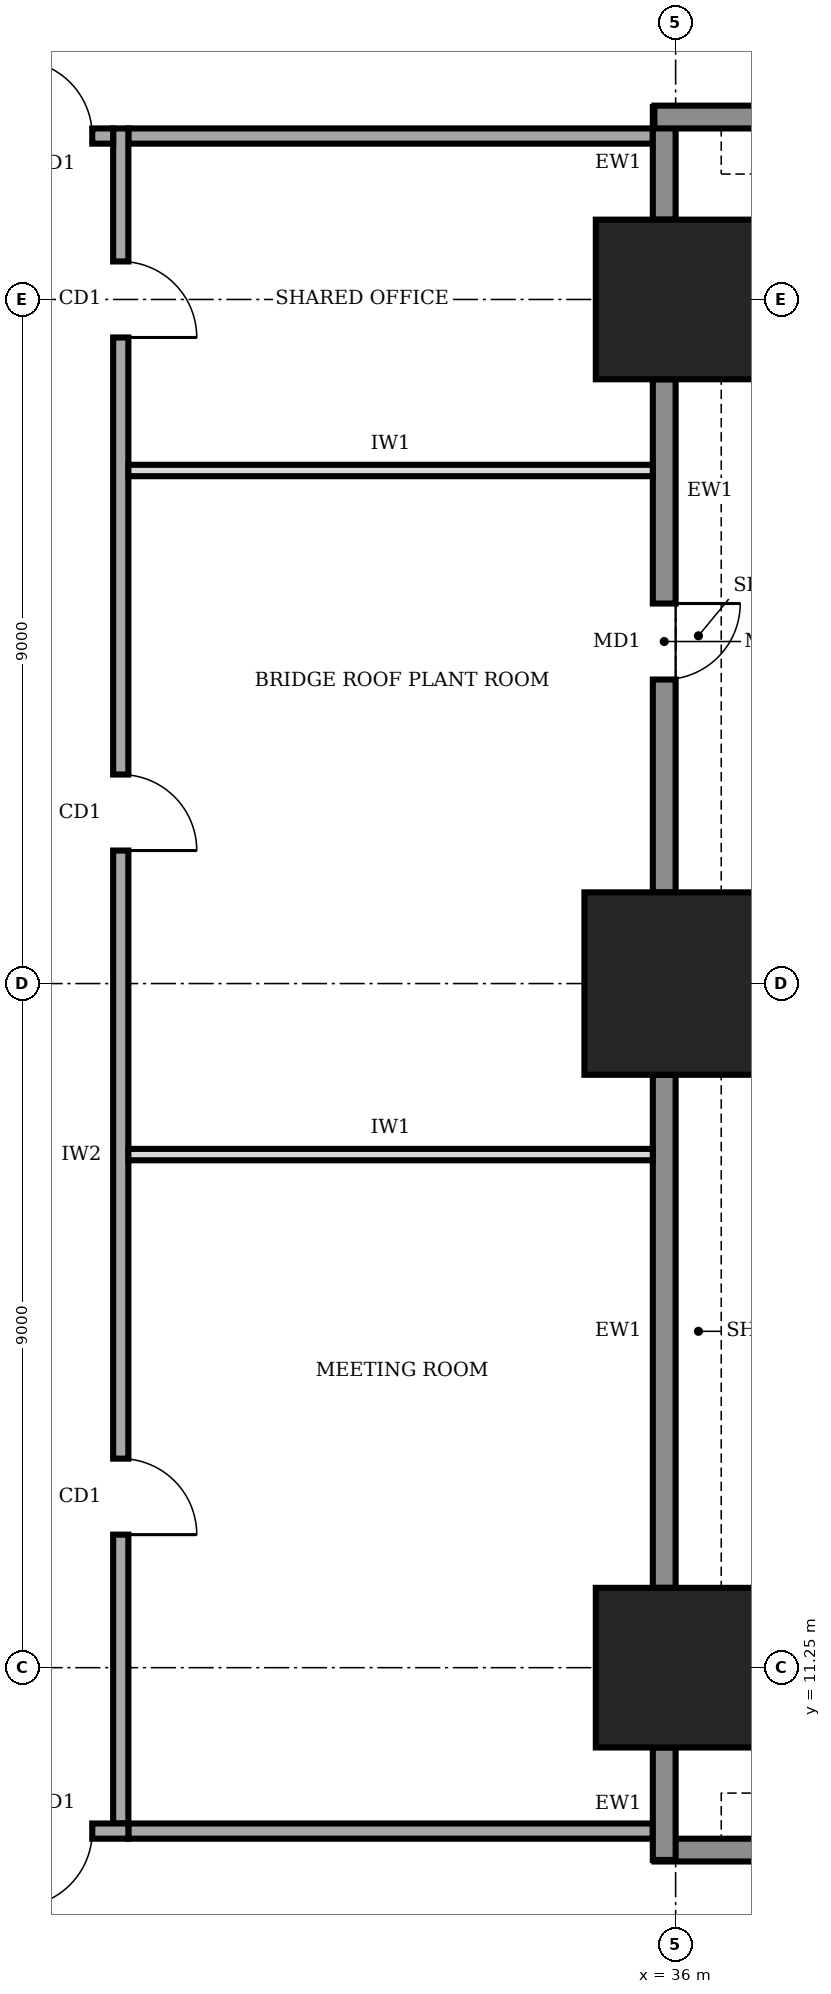
"""IFC4 building model, lengths in metres.
Left out: names, types, materials, properties, quantities, classifications, styles, units other than length and angle.
Written with IfcOpenShell. Run it as: python <this file> out.ifc"""

import sys

from ifc_helpers import new_model, si_unit, direction, frame, frame_2d, origin, origin_2d, place, context, subcontext, project, spatial, rectangle, extrude, element, fill, save


model = new_model("IFC4")
c1 = context("Model", 3, precision=1e-05, world=origin(), true_north=direction((0.0, 1.0)))
c2 = subcontext(c1, "Body", "Model", "MODEL_VIEW")
j1 = project(units=[si_unit("LENGTHUNIT", "METRE"), si_unit("PLANEANGLEUNIT", "RADIAN")], contexts=[c1])
p1 = place(None, origin())
s1 = spatial("IfcSite", under=j1, at=p1, CompositionType="ELEMENT")
p2 = place(p1, origin())
s2 = spatial("IfcBuilding", under=s1, at=p2, CompositionType="ELEMENT")
p3 = place(p2, frame((0.0, 0.0, 137.0)))
s3 = spatial("IfcBuildingStorey", under=s2, at=p3, CompositionType="ELEMENT", Elevation=137.0)
p4 = place(p3, frame((36.0, 11.25, 0.0), z_axis=(0.0, 0.0, 1.0), x_axis=(1.0, 0.0, 0.0)))
e1 = element("IfcColumn", 1, at=p4, inside=s3, PredefinedType="COLUMN", context=c2, shape_type="SweptSolid", body=[
    extrude(rectangle(XDim=2.1, YDim=2.1, at=origin_2d()), origin(), (0.0, 0.0, 1.0), 4.0),
])
p5 = place(p3, frame((36.0, 20.25, 0.0), z_axis=(0.0, 0.0, 1.0), x_axis=(1.0, 0.0, 0.0)))
e2 = element("IfcColumn", 2, at=p5, inside=s3, PredefinedType="COLUMN", context=c2, shape_type="SweptSolid", body=[
    extrude(rectangle(XDim=2.4, YDim=2.4, at=origin_2d()), origin(), (0.0, 0.0, 1.0), 4.0),
])
p6 = place(p3, frame((36.0, 29.25, 0.0), z_axis=(0.0, 0.0, 1.0), x_axis=(1.0, 0.0, 0.0)))
e3 = element("IfcColumn", 3, at=p6, inside=s3, PredefinedType="COLUMN", context=c2, shape_type="SweptSolid", body=[
    extrude(rectangle(XDim=2.1, YDim=2.1, at=origin_2d()), origin(), (0.0, 0.0, 1.0), 4.0),
])
p7 = place(p3, frame((40.48, 8.85, 0.0), z_axis=(0.0, 0.0, 1.0), x_axis=(-1.0, 0.0, 0.0)))
e4 = element("IfcWall", 4, at=p7, inside=s3, PredefinedType="STANDARD", context=c2, shape_type="SweptSolid", body=[
    extrude(rectangle(XDim=4.76, YDim=0.3, at=frame_2d((2.38, 0.0))), origin(), (0.0, 0.0, 1.0), 3.75),
])
p8 = place(p3, frame((35.85, 8.72, 0.0), z_axis=(0.0, 0.0, 1.0), x_axis=(0.0, 1.0, 0.0)))
e5 = element("IfcWall", 5, at=p8, inside=s3, PredefinedType="STANDARD", context=c2, shape_type="SweptSolid", body=[
    extrude(rectangle(XDim=1.48, YDim=0.3, at=frame_2d((0.74, 0.0))), origin(), (0.0, 0.0, 1.0), 2.65),
])
p9 = place(p3, frame((35.85, 12.3, 0.0), z_axis=(0.0, 0.0, 1.0), x_axis=(0.0, 1.0, 0.0)))
e6 = element("IfcWall", 6, at=p9, inside=s3, PredefinedType="STANDARD", context=c2, shape_type="SweptSolid", body=[
    extrude(rectangle(XDim=6.75, YDim=0.3, at=frame_2d((3.375, 0.0))), origin(), (0.0, 0.0, 1.0), 2.65),
])
p10 = place(p3, frame((35.85, 21.45, 0.0), z_axis=(0.0, 0.0, 1.0), x_axis=(0.0, 1.0, 0.0)))
e7 = element("IfcWall", 7, at=p10, inside=s3, PredefinedType="STANDARD", context=c2, shape_type="SweptSolid", body=[
    extrude(rectangle(XDim=6.75, YDim=0.3, at=frame_2d((3.375, 0.0))), origin(), (0.0, 0.0, 1.0), 2.65),
])
p11 = place(p10, frame((2.8, 0.0, 0.0)))
e8 = element("IfcOpeningElement", 8, at=p11, cuts=e7, PredefinedType="OPENING", context=c2, shape_type="SweptSolid", body=[
    extrude(rectangle(XDim=1.0, YDim=2.1, at=frame_2d((0.5, 1.05))), frame((0.0, 0.16, 0.0), z_axis=(0.0, -1.0, 0.0), x_axis=(1.0, 0.0, 0.0)), (0.0, 0.0, 1.0), 0.32),
])
p12 = place(p3, frame((35.85, 30.3, 0.0), z_axis=(0.0, 0.0, 1.0), x_axis=(0.0, 1.0, 0.0)))
e9 = element("IfcWall", 9, at=p12, inside=s3, PredefinedType="STANDARD", context=c2, shape_type="SweptSolid", body=[
    extrude(rectangle(XDim=1.48, YDim=0.3, at=frame_2d((0.74, 0.0))), origin(), (0.0, 0.0, 1.0), 2.65),
])
p13 = place(p3, frame((35.72, 31.65, 0.0), z_axis=(0.0, 0.0, 1.0), x_axis=(1.0, 0.0, 0.0)))
e10 = element("IfcWall", 10, at=p13, inside=s3, PredefinedType="STANDARD", context=c2, shape_type="SweptSolid", body=[
    extrude(rectangle(XDim=4.76, YDim=0.3, at=frame_2d((2.38, 0.0))), origin(), (0.0, 0.0, 1.0), 3.75),
])
p14 = place(p3, frame((11.9, 9.1, 0.0), z_axis=(0.0, 0.0, 1.0), x_axis=(1.0, 0.0, 0.0)))
e11 = element("IfcWall", 11, at=p14, inside=s3, PredefinedType="SOLIDWALL", context=c2, shape_type="SweptSolid", body=[
    extrude(rectangle(XDim=16.9, YDim=0.2, at=frame_2d((8.45, 0.0))), origin(), (0.0, 0.0, 1.0), 3.75),
])
p15 = place(p14, frame((0.275, 0.0, 0.0)))
e12 = element("IfcOpeningElement", 12, at=p15, cuts=e11, PredefinedType="OPENING", context=c2, shape_type="SweptSolid", body=[
    extrude(rectangle(XDim=1.0, YDim=2.1, at=frame_2d((0.5, 1.05))), frame((0.0, 0.11, 0.0), z_axis=(0.0, -1.0, 0.0), x_axis=(1.0, 0.0, 0.0)), (0.0, 0.0, 1.0), 0.22),
])
p16 = place(p14, frame((5.6, 0.0, 0.0)))
e13 = element("IfcOpeningElement", 13, at=p16, cuts=e11, PredefinedType="OPENING", context=c2, shape_type="SweptSolid", body=[
    extrude(rectangle(XDim=1.0, YDim=2.1, at=frame_2d((0.5, 1.05))), frame((0.0, 0.11, 0.0), z_axis=(0.0, -1.0, 0.0), x_axis=(1.0, 0.0, 0.0)), (0.0, 0.0, 1.0), 0.22),
])
p17 = place(p14, frame((12.35, 0.0, 0.0)))
e14 = element("IfcOpeningElement", 14, at=p17, cuts=e11, PredefinedType="OPENING", context=c2, shape_type="SweptSolid", body=[
    extrude(rectangle(XDim=1.0, YDim=2.1, at=frame_2d((0.5, 1.05))), frame((0.0, 0.11, 0.0), z_axis=(0.0, -1.0, 0.0), x_axis=(1.0, 0.0, 0.0)), (0.0, 0.0, 1.0), 0.22),
])
p18 = place(p14, frame((15.425, 0.0, 0.0)))
e15 = element("IfcOpeningElement", 15, at=p18, cuts=e11, PredefinedType="OPENING", context=c2, shape_type="SweptSolid", body=[
    extrude(rectangle(XDim=1.0, YDim=2.1, at=frame_2d((0.5, 1.05))), frame((0.0, 0.11, 0.0), z_axis=(0.0, -1.0, 0.0), x_axis=(1.0, 0.0, 0.0)), (0.0, 0.0, 1.0), 0.22),
])
p19 = place(p3, frame((28.7, 9.2, 0.0), z_axis=(0.0, 0.0, 1.0), x_axis=(0.0, 1.0, 0.0)))
e16 = element("IfcWall", 16, at=p19, inside=s3, PredefinedType="SOLIDWALL", context=c2, shape_type="SweptSolid", body=[
    extrude(rectangle(XDim=22.3, YDim=0.2, at=frame_2d((11.15, 0.0))), origin(), (0.0, 0.0, 1.0), 3.75),
])
p20 = place(p19, frame((3.8, 0.0, 0.0)))
e17 = element("IfcOpeningElement", 17, at=p20, cuts=e16, PredefinedType="OPENING", context=c2, shape_type="SweptSolid", body=[
    extrude(rectangle(XDim=1.0, YDim=2.1, at=frame_2d((0.5, 1.05))), frame((0.0, 0.11, 0.0), z_axis=(0.0, -1.0, 0.0), x_axis=(1.0, 0.0, 0.0)), (0.0, 0.0, 1.0), 0.22),
])
p21 = place(p19, frame((12.8, 0.0, 0.0)))
e18 = element("IfcOpeningElement", 18, at=p21, cuts=e16, PredefinedType="OPENING", context=c2, shape_type="SweptSolid", body=[
    extrude(rectangle(XDim=1.0, YDim=2.1, at=frame_2d((0.5, 1.05))), frame((0.0, 0.11, 0.0), z_axis=(0.0, -1.0, 0.0), x_axis=(1.0, 0.0, 0.0)), (0.0, 0.0, 1.0), 0.22),
])
p22 = place(p19, frame((19.55, 0.0, 0.0)))
e19 = element("IfcOpeningElement", 19, at=p22, cuts=e16, PredefinedType="OPENING", context=c2, shape_type="SweptSolid", body=[
    extrude(rectangle(XDim=1.0, YDim=2.1, at=frame_2d((0.5, 1.05))), frame((0.0, 0.11, 0.0), z_axis=(0.0, -1.0, 0.0), x_axis=(1.0, 0.0, 0.0)), (0.0, 0.0, 1.0), 0.22),
])
p23 = place(p3, frame((28.6, 31.4, 0.0), z_axis=(0.0, 0.0, 1.0), x_axis=(-1.0, 0.0, 0.0)))
e20 = element("IfcWall", 20, at=p23, inside=s3, PredefinedType="SOLIDWALL", context=c2, shape_type="SweptSolid", body=[
    extrude(rectangle(XDim=16.9, YDim=0.2, at=frame_2d((8.45, 0.0))), origin(), (0.0, 0.0, 1.0), 3.75),
])
p24 = place(p23, frame((15.425, 0.0, 0.0)))
e21 = element("IfcOpeningElement", 21, at=p24, cuts=e20, PredefinedType="OPENING", context=c2, shape_type="SweptSolid", body=[
    extrude(rectangle(XDim=1.0, YDim=2.1, at=frame_2d((0.5, 1.05))), frame((0.0, 0.11, 0.0), z_axis=(0.0, -1.0, 0.0), x_axis=(1.0, 0.0, 0.0)), (0.0, 0.0, 1.0), 0.22),
])
p25 = place(p23, frame((12.35, 0.0, 0.0)))
e22 = element("IfcOpeningElement", 22, at=p25, cuts=e20, PredefinedType="OPENING", context=c2, shape_type="SweptSolid", body=[
    extrude(rectangle(XDim=1.0, YDim=2.1, at=frame_2d((0.5, 1.05))), frame((0.0, 0.11, 0.0), z_axis=(0.0, -1.0, 0.0), x_axis=(1.0, 0.0, 0.0)), (0.0, 0.0, 1.0), 0.22),
])
p26 = place(p23, frame((5.6, 0.0, 0.0)))
e23 = element("IfcOpeningElement", 23, at=p26, cuts=e20, PredefinedType="OPENING", context=c2, shape_type="SweptSolid", body=[
    extrude(rectangle(XDim=1.0, YDim=2.1, at=frame_2d((0.5, 1.05))), frame((0.0, 0.11, 0.0), z_axis=(0.0, -1.0, 0.0), x_axis=(1.0, 0.0, 0.0)), (0.0, 0.0, 1.0), 0.22),
])
p27 = place(p23, frame((0.275, 0.0, 0.0)))
e24 = element("IfcOpeningElement", 24, at=p27, cuts=e20, PredefinedType="OPENING", context=c2, shape_type="SweptSolid", body=[
    extrude(rectangle(XDim=1.0, YDim=2.1, at=frame_2d((0.5, 1.05))), frame((0.0, 0.11, 0.0), z_axis=(0.0, -1.0, 0.0), x_axis=(1.0, 0.0, 0.0)), (0.0, 0.0, 1.0), 0.22),
])
for number, where, z_axis, x_axis in (
    (25, (28.8, 9.1, 0.0), (0.0, 0.0, 1.0), (1.0, 0.0, 0.0)),
    (26, (28.8, 31.4, 0.0), (0.0, 0.0, 1.0), (1.0, 0.0, 0.0)),
):
    element("IfcWall", number, at=place(p3, frame(where, z_axis=z_axis, x_axis=x_axis)), inside=s3, PredefinedType="SOLIDWALL", context=c2, shape_type="SweptSolid", body=[
        extrude(rectangle(XDim=6.9, YDim=0.2, at=frame_2d((3.45, 0.0))), origin(), (0.0, 0.0, 1.0), 3.75),
    ])
for number, where, z_axis, x_axis in (
    (27, (28.8, 18.0, 0.0), (0.0, 0.0, 1.0), (1.0, 0.0, 0.0)),
    (28, (28.8, 27.0, 0.0), (0.0, 0.0, 1.0), (1.0, 0.0, 0.0)),
):
    element("IfcWall", number, at=place(p3, frame(where, z_axis=z_axis, x_axis=x_axis)), inside=s3, PredefinedType="PARTITIONING", context=c2, shape_type="SweptSolid", body=[
        extrude(rectangle(XDim=6.9, YDim=0.15, at=frame_2d((3.45, 0.0))), origin(), (0.0, 0.0, 1.0), 3.75),
    ])
p28 = place(p11, frame((1.0, 0.0, 0.0), z_axis=(0.0, 0.0, 1.0), x_axis=(-1.0, 0.0, 0.0)))
e29 = element("IfcDoor", 29, at=p28, inside=s3, OperationType="SINGLE_SWING_LEFT", PredefinedType="DOOR", context=c2, shape_type="SweptSolid", body=[
    extrude(rectangle(XDim=1.0, YDim=2.1, at=frame_2d((0.5, 1.05))), frame((0.0, 0.025, 0.0), z_axis=(0.0, -1.0, 0.0), x_axis=(1.0, 0.0, 0.0)), (0.0, 0.0, 1.0), 0.05),
])
fill(e8, e29)
p29 = place(p18, frame((1.0, 0.0, 0.0), z_axis=(0.0, 0.0, 1.0), x_axis=(-1.0, 0.0, 0.0)))
e30 = element("IfcDoor", 30, at=p29, inside=s3, OperationType="SINGLE_SWING_RIGHT", PredefinedType="DOOR", context=c2, shape_type="SweptSolid", body=[
    extrude(rectangle(XDim=1.0, YDim=2.1, at=frame_2d((0.5, 1.05))), frame((0.0, 0.025, 0.0), z_axis=(0.0, -1.0, 0.0), x_axis=(1.0, 0.0, 0.0)), (0.0, 0.0, 1.0), 0.05),
])
fill(e15, e30)
p30 = place(p20, frame((1.0, 0.0, 0.0), z_axis=(0.0, 0.0, 1.0), x_axis=(-1.0, 0.0, 0.0)))
e31 = element("IfcDoor", 31, at=p30, inside=s3, OperationType="SINGLE_SWING_RIGHT", PredefinedType="DOOR", context=c2, shape_type="SweptSolid", body=[
    extrude(rectangle(XDim=1.0, YDim=2.1, at=frame_2d((0.5, 1.05))), frame((0.0, 0.025, 0.0), z_axis=(0.0, -1.0, 0.0), x_axis=(1.0, 0.0, 0.0)), (0.0, 0.0, 1.0), 0.05),
])
fill(e17, e31)
p31 = place(p21, frame((1.0, 0.0, 0.0), z_axis=(0.0, 0.0, 1.0), x_axis=(-1.0, 0.0, 0.0)))
e32 = element("IfcDoor", 32, at=p31, inside=s3, OperationType="SINGLE_SWING_RIGHT", PredefinedType="DOOR", context=c2, shape_type="SweptSolid", body=[
    extrude(rectangle(XDim=1.0, YDim=2.1, at=frame_2d((0.5, 1.05))), frame((0.0, 0.025, 0.0), z_axis=(0.0, -1.0, 0.0), x_axis=(1.0, 0.0, 0.0)), (0.0, 0.0, 1.0), 0.05),
])
fill(e18, e32)
p32 = place(p22, frame((1.0, 0.0, 0.0), z_axis=(0.0, 0.0, 1.0), x_axis=(-1.0, 0.0, 0.0)))
e33 = element("IfcDoor", 33, at=p32, inside=s3, OperationType="SINGLE_SWING_RIGHT", PredefinedType="DOOR", context=c2, shape_type="SweptSolid", body=[
    extrude(rectangle(XDim=1.0, YDim=2.1, at=frame_2d((0.5, 1.05))), frame((0.0, 0.025, 0.0), z_axis=(0.0, -1.0, 0.0), x_axis=(1.0, 0.0, 0.0)), (0.0, 0.0, 1.0), 0.05),
])
fill(e19, e33)
p33 = place(p27, frame((1.0, 0.0, 0.0), z_axis=(0.0, 0.0, 1.0), x_axis=(-1.0, 0.0, 0.0)))
e34 = element("IfcDoor", 34, at=p33, inside=s3, OperationType="SINGLE_SWING_LEFT", PredefinedType="DOOR", context=c2, shape_type="SweptSolid", body=[
    extrude(rectangle(XDim=1.0, YDim=2.1, at=frame_2d((0.5, 1.05))), frame((0.0, 0.025, 0.0), z_axis=(0.0, -1.0, 0.0), x_axis=(1.0, 0.0, 0.0)), (0.0, 0.0, 1.0), 0.05),
])
fill(e24, e34)
save(model, sys.argv[1])
